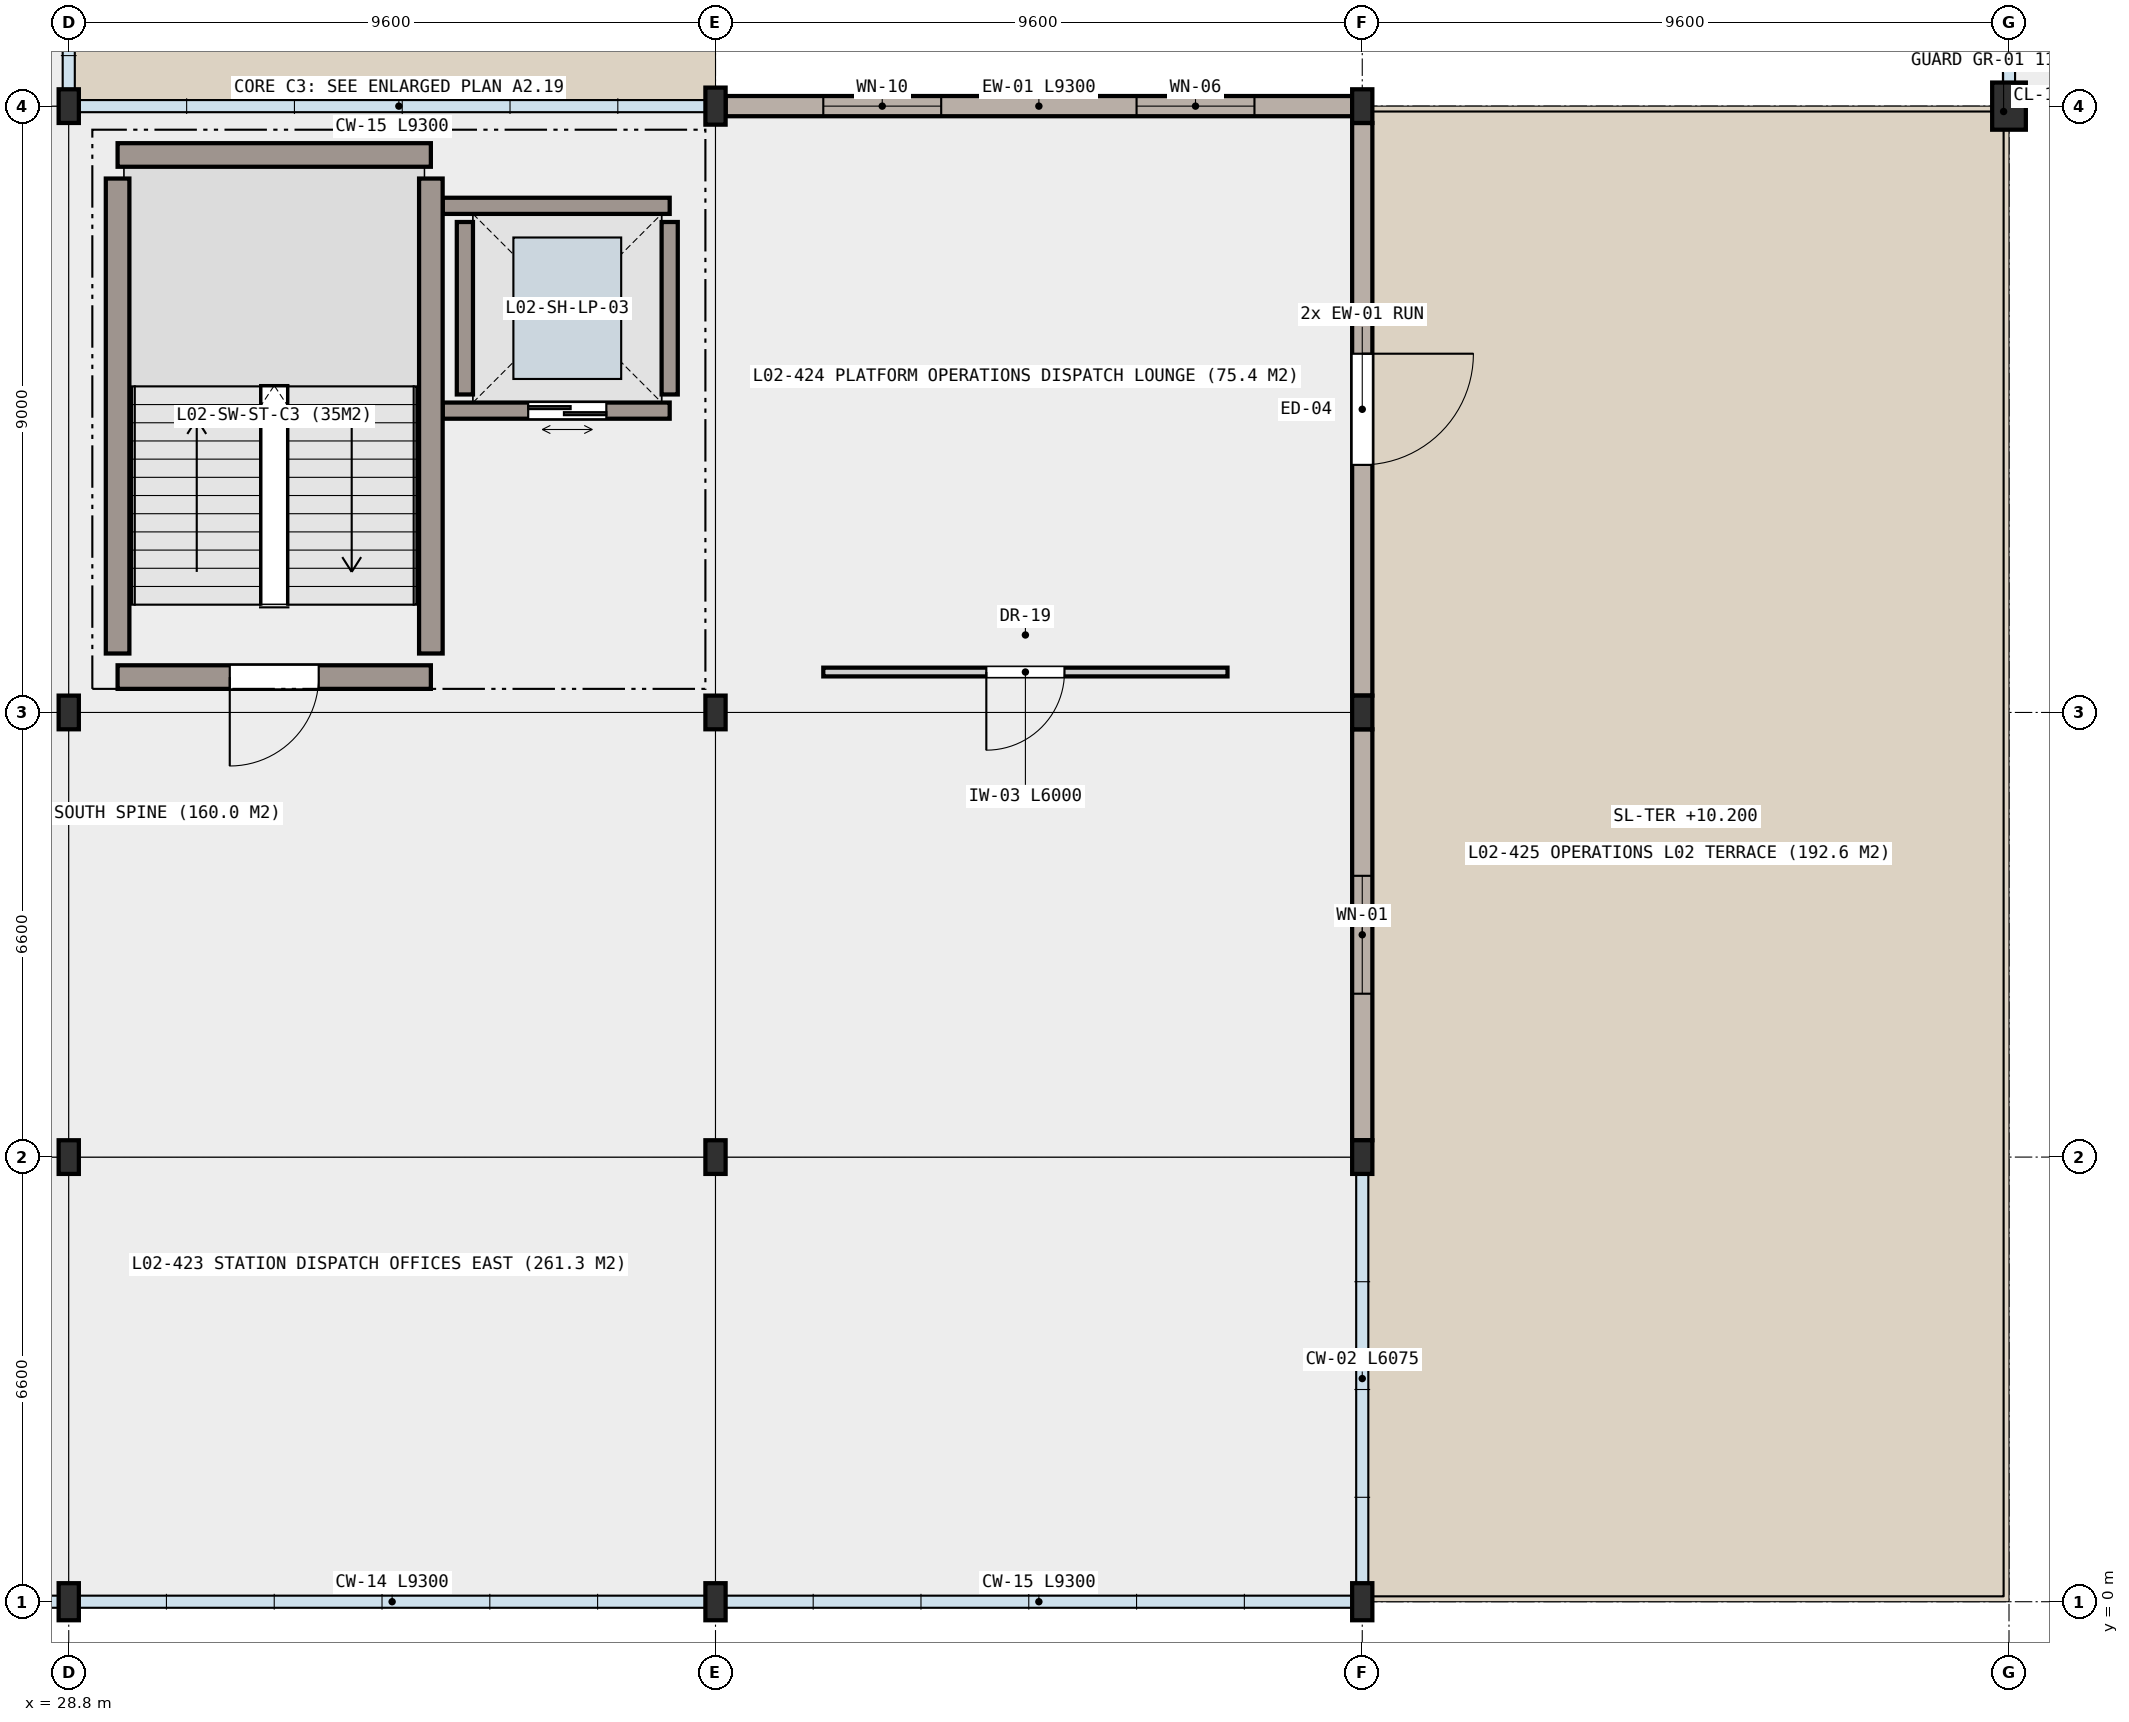
"""IFC4 building model, lengths in metres.
Left out: names, types, materials, properties, quantities, classifications, styles, units other than length and angle.
Written with IfcOpenShell. Run it as: python <this file> out.ifc"""

import sys

from ifc_helpers import new_model, si_unit, direction, frame, frame_2d, origin, origin_2d, place, context, subcontext, project, spatial, rectangle, hollow_rectangle, i_section, extrude, element, fill, save


model = new_model("IFC4")
c1 = context("Model", 3, precision=1e-05, world=origin(), true_north=direction((0.0, 1.0)))
c2 = subcontext(c1, "Body", "Model", "MODEL_VIEW")
j1 = project(units=[si_unit("LENGTHUNIT", "METRE"), si_unit("PLANEANGLEUNIT", "RADIAN")], contexts=[c1])
p1 = place(None, origin())
s1 = spatial("IfcSite", under=j1, at=p1, CompositionType="ELEMENT")
p2 = place(p1, origin())
s2 = spatial("IfcBuilding", under=s1, at=p2, CompositionType="ELEMENT")
p3 = place(p2, frame((0.0, 0.0, 10.2)))
s3 = spatial("IfcBuildingStorey", under=s2, at=p3, CompositionType="ELEMENT", Elevation=10.2)
p4 = place(p3, frame((28.8, 0.0, 0.0), z_axis=(0.0, 0.0, 1.0), x_axis=(1.0, 0.0, 0.0)))
e1 = element("IfcColumn", 1, at=p4, inside=s3, PredefinedType="COLUMN", context=c2, shape_type="SweptSolid", body=[
    extrude(i_section(OverallWidth=0.3, OverallDepth=0.55, WebThickness=0.015, FlangeThickness=0.029, FilletRadius=0.027, at=origin_2d()), origin(), (0.0, 0.0, 1.0), 4.2),
])
for number, where, z_axis, x_axis in (
    (2, (28.8, 6.6, 0.0), (0.0, 0.0, 1.0), (1.0, 0.0, 0.0)),
    (3, (28.8, 13.2, 0.0), (0.0, 0.0, 1.0), (1.0, 0.0, 0.0)),
    (4, (28.8, 22.2, 0.0), (0.0, 0.0, 1.0), (1.0, 0.0, 0.0)),
):
    element("IfcColumn", number, at=place(p3, frame(where, z_axis=z_axis, x_axis=x_axis)), inside=s3, PredefinedType="COLUMN", context=c2, shape_type="SweptSolid", body=[
        extrude(i_section(OverallWidth=0.3, OverallDepth=0.5, WebThickness=0.014, FlangeThickness=0.028, FilletRadius=0.027, at=origin_2d()), origin(), (0.0, 0.0, 1.0), 4.2),
    ])
p5 = place(p3, frame((38.4, 0.0, 0.0), z_axis=(0.0, 0.0, 1.0), x_axis=(1.0, 0.0, 0.0)))
e5 = element("IfcColumn", 5, at=p5, inside=s3, PredefinedType="COLUMN", context=c2, shape_type="SweptSolid", body=[
    extrude(i_section(OverallWidth=0.3, OverallDepth=0.55, WebThickness=0.015, FlangeThickness=0.029, FilletRadius=0.027, at=origin_2d()), origin(), (0.0, 0.0, 1.0), 4.2),
])
for number, where, z_axis, x_axis in (
    (6, (38.4, 6.6, 0.0), (0.0, 0.0, 1.0), (1.0, 0.0, 0.0)),
    (7, (38.4, 13.2, 0.0), (0.0, 0.0, 1.0), (1.0, 0.0, 0.0)),
):
    element("IfcColumn", number, at=place(p3, frame(where, z_axis=z_axis, x_axis=x_axis)), inside=s3, PredefinedType="COLUMN", context=c2, shape_type="SweptSolid", body=[
        extrude(i_section(OverallWidth=0.3, OverallDepth=0.5, WebThickness=0.014, FlangeThickness=0.028, FilletRadius=0.027, at=origin_2d()), origin(), (0.0, 0.0, 1.0), 4.2),
    ])
for number, where, z_axis, x_axis in (
    (8, (38.4, 22.2, 0.0), (0.0, 0.0, 1.0), (1.0, 0.0, 0.0)),
    (9, (48.0, 0.0, 0.0), (0.0, 0.0, 1.0), (1.0, 0.0, 0.0)),
):
    element("IfcColumn", number, at=place(p3, frame(where, z_axis=z_axis, x_axis=x_axis)), inside=s3, PredefinedType="COLUMN", context=c2, shape_type="SweptSolid", body=[
        extrude(i_section(OverallWidth=0.3, OverallDepth=0.55, WebThickness=0.015, FlangeThickness=0.029, FilletRadius=0.027, at=origin_2d()), origin(), (0.0, 0.0, 1.0), 4.2),
    ])
for number, where, z_axis, x_axis in (
    (10, (48.0, 6.6, 0.0), (0.0, 0.0, 1.0), (1.0, 0.0, 0.0)),
    (11, (48.0, 13.2, 0.0), (0.0, 0.0, 1.0), (1.0, 0.0, 0.0)),
    (12, (48.0, 22.2, 0.0), (0.0, 0.0, 1.0), (1.0, 0.0, 0.0)),
):
    element("IfcColumn", number, at=place(p3, frame(where, z_axis=z_axis, x_axis=x_axis)), inside=s3, PredefinedType="COLUMN", context=c2, shape_type="SweptSolid", body=[
        extrude(i_section(OverallWidth=0.3, OverallDepth=0.5, WebThickness=0.014, FlangeThickness=0.028, FilletRadius=0.027, at=origin_2d()), origin(), (0.0, 0.0, 1.0), 4.2),
    ])
p6 = place(p3, frame((57.6, 22.2, 0.0), z_axis=(0.0, 0.0, 1.0), x_axis=(1.0, 0.0, 0.0)))
e13 = element("IfcColumn", 13, at=p6, inside=s3, PredefinedType="COLUMN", context=c2, shape_type="SweptSolid", body=[
    extrude(hollow_rectangle(XDim=0.5, YDim=0.7, WallThickness=0.032, at=origin_2d()), origin(), (0.0, 0.0, 1.0), 4.188),
])
p7 = place(p3, frame((38.55, 22.2, 0.0), z_axis=(0.0, 0.0, 1.0), x_axis=(1.0, 0.0, 0.0)))
e14 = element("IfcWall", 14, at=p7, inside=s3, PredefinedType="SOLIDWALL", context=c2, shape_type="SweptSolid", body=[
    extrude(rectangle(XDim=9.3, YDim=0.3, at=frame_2d((4.65, 0.0))), origin(), (0.0, 0.0, 1.0), 3.32),
])
p8 = place(p7, frame((1.45, 0.0, 0.85)))
e15 = element("IfcOpeningElement", 15, at=p8, cuts=e14, PredefinedType="OPENING", context=c2, shape_type="SweptSolid", body=[
    extrude(rectangle(XDim=1.75, YDim=1.5, at=frame_2d((0.875, 0.75))), frame((0.0, 0.16, 0.0), z_axis=(0.0, -1.0, 0.0), x_axis=(1.0, 0.0, 0.0)), (0.0, 0.0, 1.0), 0.32),
])
p9 = place(p7, frame((6.1, 0.0, 0.85)))
e16 = element("IfcOpeningElement", 16, at=p9, cuts=e14, PredefinedType="OPENING", context=c2, shape_type="SweptSolid", body=[
    extrude(rectangle(XDim=1.75, YDim=1.85, at=frame_2d((0.875, 0.925))), frame((0.0, 0.16, 0.0), z_axis=(0.0, -1.0, 0.0), x_axis=(1.0, 0.0, 0.0)), (0.0, 0.0, 1.0), 0.32),
])
p10 = place(p3, frame((48.0, 21.95, 0.0), z_axis=(0.0, 0.0, 1.0), x_axis=(0.0, -1.0, 0.0)))
e17 = element("IfcWall", 17, at=p10, inside=s3, PredefinedType="SOLIDWALL", context=c2, shape_type="SweptSolid", body=[
    extrude(rectangle(XDim=8.5, YDim=0.3, at=frame_2d((4.25, 0.0))), origin(), (0.0, 0.0, 1.0), 3.37),
])
p11 = place(p10, frame((3.425, 0.0, 0.0)))
e18 = element("IfcOpeningElement", 18, at=p11, cuts=e17, PredefinedType="OPENING", context=c2, shape_type="SweptSolid", body=[
    extrude(rectangle(XDim=1.65, YDim=2.25, at=frame_2d((0.825, 1.125))), frame((0.0, 0.16, 0.0), z_axis=(0.0, -1.0, 0.0), x_axis=(1.0, 0.0, 0.0)), (0.0, 0.0, 1.0), 0.32),
])
p12 = place(p3, frame((48.0, 12.95, 0.0), z_axis=(0.0, 0.0, 1.0), x_axis=(0.0, -1.0, 0.0)))
e19 = element("IfcWall", 19, at=p12, inside=s3, PredefinedType="SOLIDWALL", context=c2, shape_type="SweptSolid", body=[
    extrude(rectangle(XDim=6.1, YDim=0.3, at=frame_2d((3.05, 0.0))), origin(), (0.0, 0.0, 1.0), 3.42),
])
p13 = place(p12, frame((2.175, 0.0, 0.85)))
e20 = element("IfcOpeningElement", 20, at=p13, cuts=e19, PredefinedType="OPENING", context=c2, shape_type="SweptSolid", body=[
    extrude(rectangle(XDim=1.75, YDim=2.15, at=frame_2d((0.875, 1.075))), frame((0.0, 0.16, 0.0), z_axis=(0.0, -1.0, 0.0), x_axis=(1.0, 0.0, 0.0)), (0.0, 0.0, 1.0), 0.32),
])
p14 = place(p3, frame((37.72, 17.68, 0.0), z_axis=(0.0, 0.0, 1.0), x_axis=(-1.0, 0.0, 0.0)))
e21 = element("IfcWall", 21, at=p14, inside=s3, PredefinedType="SHEAR", context=c2, shape_type="SweptSolid", body=[
    extrude(rectangle(XDim=3.37, YDim=0.24, at=frame_2d((1.685, 0.0))), origin(), (0.0, 0.0, 1.0), 3.95),
])
p15 = place(p14, frame((0.94, 0.0, 0.0)))
e22 = element("IfcOpeningElement", 22, at=p15, cuts=e21, PredefinedType="OPENING", context=c2, shape_type="SweptSolid", body=[
    extrude(rectangle(XDim=1.16, YDim=2.15, at=frame_2d((0.58, 1.075))), frame((0.0, 0.13, 0.0), z_axis=(0.0, -1.0, 0.0), x_axis=(1.0, 0.0, 0.0)), (0.0, 0.0, 1.0), 0.26),
])
p16 = place(p3, frame((34.35, 20.72, 0.0), z_axis=(0.0, 0.0, 1.0), x_axis=(1.0, 0.0, 0.0)))
e23 = element("IfcWall", 23, at=p16, inside=s3, PredefinedType="SHEAR", context=c2, shape_type="SweptSolid", body=[
    extrude(rectangle(XDim=3.37, YDim=0.24, at=frame_2d((1.685, 0.0))), origin(), (0.0, 0.0, 1.0), 3.95),
])
for number, where, z_axis, x_axis in (
    (24, (34.68, 17.92, 0.0), (0.0, 0.0, 1.0), (0.0, 1.0, 0.0)),
    (25, (37.72, 20.48, 0.0), (0.0, 0.0, 1.0), (0.0, -1.0, 0.0)),
):
    element("IfcWall", number, at=place(p3, frame(where, z_axis=z_axis, x_axis=x_axis)), inside=s3, PredefinedType="SHEAR", context=c2, shape_type="SweptSolid", body=[
        extrude(rectangle(XDim=2.56, YDim=0.24, at=frame_2d((1.28, 0.0))), origin(), (0.0, 0.0, 1.0), 3.95),
    ])
p17 = place(p3, frame((34.175, 13.725, 0.0), z_axis=(0.0, 0.0, 1.0), x_axis=(-1.0, 0.0, 0.0)))
e26 = element("IfcWall", 26, at=p17, inside=s3, PredefinedType="SHEAR", context=c2, shape_type="SweptSolid", body=[
    extrude(rectangle(XDim=4.65, YDim=0.35, at=frame_2d((2.325, 0.0))), origin(), (0.0, 0.0, 1.0), 3.95),
])
p18 = place(p17, frame((1.665, 0.0, 0.0)))
e27 = element("IfcOpeningElement", 27, at=p18, cuts=e26, PredefinedType="OPENING", context=c2, shape_type="SweptSolid", body=[
    extrude(rectangle(XDim=1.32, YDim=2.15, at=frame_2d((0.66, 1.075))), frame((0.0, 0.185, 0.0), z_axis=(0.0, -1.0, 0.0), x_axis=(1.0, 0.0, 0.0)), (0.0, 0.0, 1.0), 0.37),
])
p19 = place(p3, frame((29.525, 21.475, 0.0), z_axis=(0.0, 0.0, 1.0), x_axis=(1.0, 0.0, 0.0)))
e28 = element("IfcWall", 28, at=p19, inside=s3, PredefinedType="SHEAR", context=c2, shape_type="SweptSolid", body=[
    extrude(rectangle(XDim=4.65, YDim=0.35, at=frame_2d((2.325, 0.0))), origin(), (0.0, 0.0, 1.0), 3.95),
])
for number, where, z_axis, x_axis in (
    (29, (29.525, 14.075, 0.0), (0.0, 0.0, 1.0), (0.0, 1.0, 0.0)),
    (30, (34.175, 21.125, 0.0), (0.0, 0.0, 1.0), (0.0, -1.0, 0.0)),
):
    element("IfcWall", number, at=place(p3, frame(where, z_axis=z_axis, x_axis=x_axis)), inside=s3, PredefinedType="SHEAR", context=c2, shape_type="SweptSolid", body=[
        extrude(rectangle(XDim=7.05, YDim=0.35, at=frame_2d((3.525, 0.0))), origin(), (0.0, 0.0, 1.0), 3.95),
    ])
p20 = place(p3, frame((46.0, 13.8, 0.0), z_axis=(0.0, 0.0, 1.0), x_axis=(-1.0, 0.0, 0.0)))
e31 = element("IfcWall", 31, at=p20, inside=s3, PredefinedType="PARTITIONING", context=c2, shape_type="SweptSolid", body=[
    extrude(rectangle(XDim=6.0, YDim=0.13, at=frame_2d((3.0, 0.0))), origin(), (0.0, 0.0, 1.0), 3.95),
])
p21 = place(p20, frame((2.42, 0.0, 0.0)))
e32 = element("IfcOpeningElement", 32, at=p21, cuts=e31, PredefinedType="OPENING", context=c2, shape_type="SweptSolid", body=[
    extrude(rectangle(XDim=1.16, YDim=2.15, at=frame_2d((0.58, 1.075))), frame((0.0, 0.075, 0.0), z_axis=(0.0, -1.0, 0.0), x_axis=(1.0, 0.0, 0.0)), (0.0, 0.0, 1.0), 0.15),
])
p22 = place(p8, origin())
e33 = element("IfcWindow", 33, at=p22, inside=s3, PartitioningType="SINGLE_PANEL", PredefinedType="WINDOW", context=c2, shape_type="SweptSolid", body=[
    extrude(rectangle(XDim=1.75, YDim=1.5, at=frame_2d((0.875, 0.75))), frame((0.0, 0.03, 0.0), z_axis=(0.0, -1.0, 0.0), x_axis=(1.0, 0.0, 0.0)), (0.0, 0.0, 1.0), 0.06),
])
fill(e15, e33)
p23 = place(p9, origin())
e34 = element("IfcWindow", 34, at=p23, inside=s3, PartitioningType="SINGLE_PANEL", PredefinedType="WINDOW", context=c2, shape_type="SweptSolid", body=[
    extrude(rectangle(XDim=1.75, YDim=1.85, at=frame_2d((0.875, 0.925))), frame((0.0, 0.03, 0.0), z_axis=(0.0, -1.0, 0.0), x_axis=(1.0, 0.0, 0.0)), (0.0, 0.0, 1.0), 0.06),
])
fill(e16, e34)
p24 = place(p11, origin())
e35 = element("IfcDoor", 35, at=p24, inside=s3, OperationType="SINGLE_SWING_LEFT", PredefinedType="DOOR", context=c2, shape_type="SweptSolid", body=[
    extrude(rectangle(XDim=1.65, YDim=2.25, at=frame_2d((0.825, 1.125))), frame((0.0, 0.025, 0.0), z_axis=(0.0, -1.0, 0.0), x_axis=(1.0, 0.0, 0.0)), (0.0, 0.0, 1.0), 0.05),
])
fill(e18, e35)
p25 = place(p13, origin())
e36 = element("IfcWindow", 36, at=p25, inside=s3, PartitioningType="SINGLE_PANEL", PredefinedType="WINDOW", context=c2, shape_type="SweptSolid", body=[
    extrude(rectangle(XDim=1.75, YDim=2.15, at=frame_2d((0.875, 1.075))), frame((0.0, 0.03, 0.0), z_axis=(0.0, -1.0, 0.0), x_axis=(1.0, 0.0, 0.0)), (0.0, 0.0, 1.0), 0.06),
])
fill(e20, e36)
p26 = place(p15, origin())
e37 = element("IfcDoor", 37, at=p26, inside=s3, OperationType="DOUBLE_DOOR_SLIDING", PredefinedType="DOOR", context=c2, shape_type="SweptSolid", body=[
    extrude(rectangle(XDim=1.16, YDim=2.15, at=frame_2d((0.58, 1.075))), frame((0.0, 0.025, 0.0), z_axis=(0.0, -1.0, 0.0), x_axis=(1.0, 0.0, 0.0)), (0.0, 0.0, 1.0), 0.05),
])
fill(e22, e37)
p27 = place(p18, origin())
e38 = element("IfcDoor", 38, at=p27, inside=s3, OperationType="SINGLE_SWING_RIGHT", PredefinedType="DOOR", context=c2, shape_type="SweptSolid", body=[
    extrude(rectangle(XDim=1.32, YDim=2.15, at=frame_2d((0.66, 1.075))), frame((0.0, 0.025, 0.0), z_axis=(0.0, -1.0, 0.0), x_axis=(1.0, 0.0, 0.0)), (0.0, 0.0, 1.0), 0.05),
])
fill(e27, e38)
p28 = place(p21, origin())
e39 = element("IfcDoor", 39, at=p28, inside=s3, OperationType="SINGLE_SWING_RIGHT", PredefinedType="DOOR", context=c2, shape_type="SweptSolid", body=[
    extrude(rectangle(XDim=1.16, YDim=2.15, at=frame_2d((0.58, 1.075))), frame((0.0, 0.025, 0.0), z_axis=(0.0, -1.0, 0.0), x_axis=(1.0, 0.0, 0.0)), (0.0, 0.0, 1.0), 0.05),
])
fill(e32, e39)
save(model, sys.argv[1])
